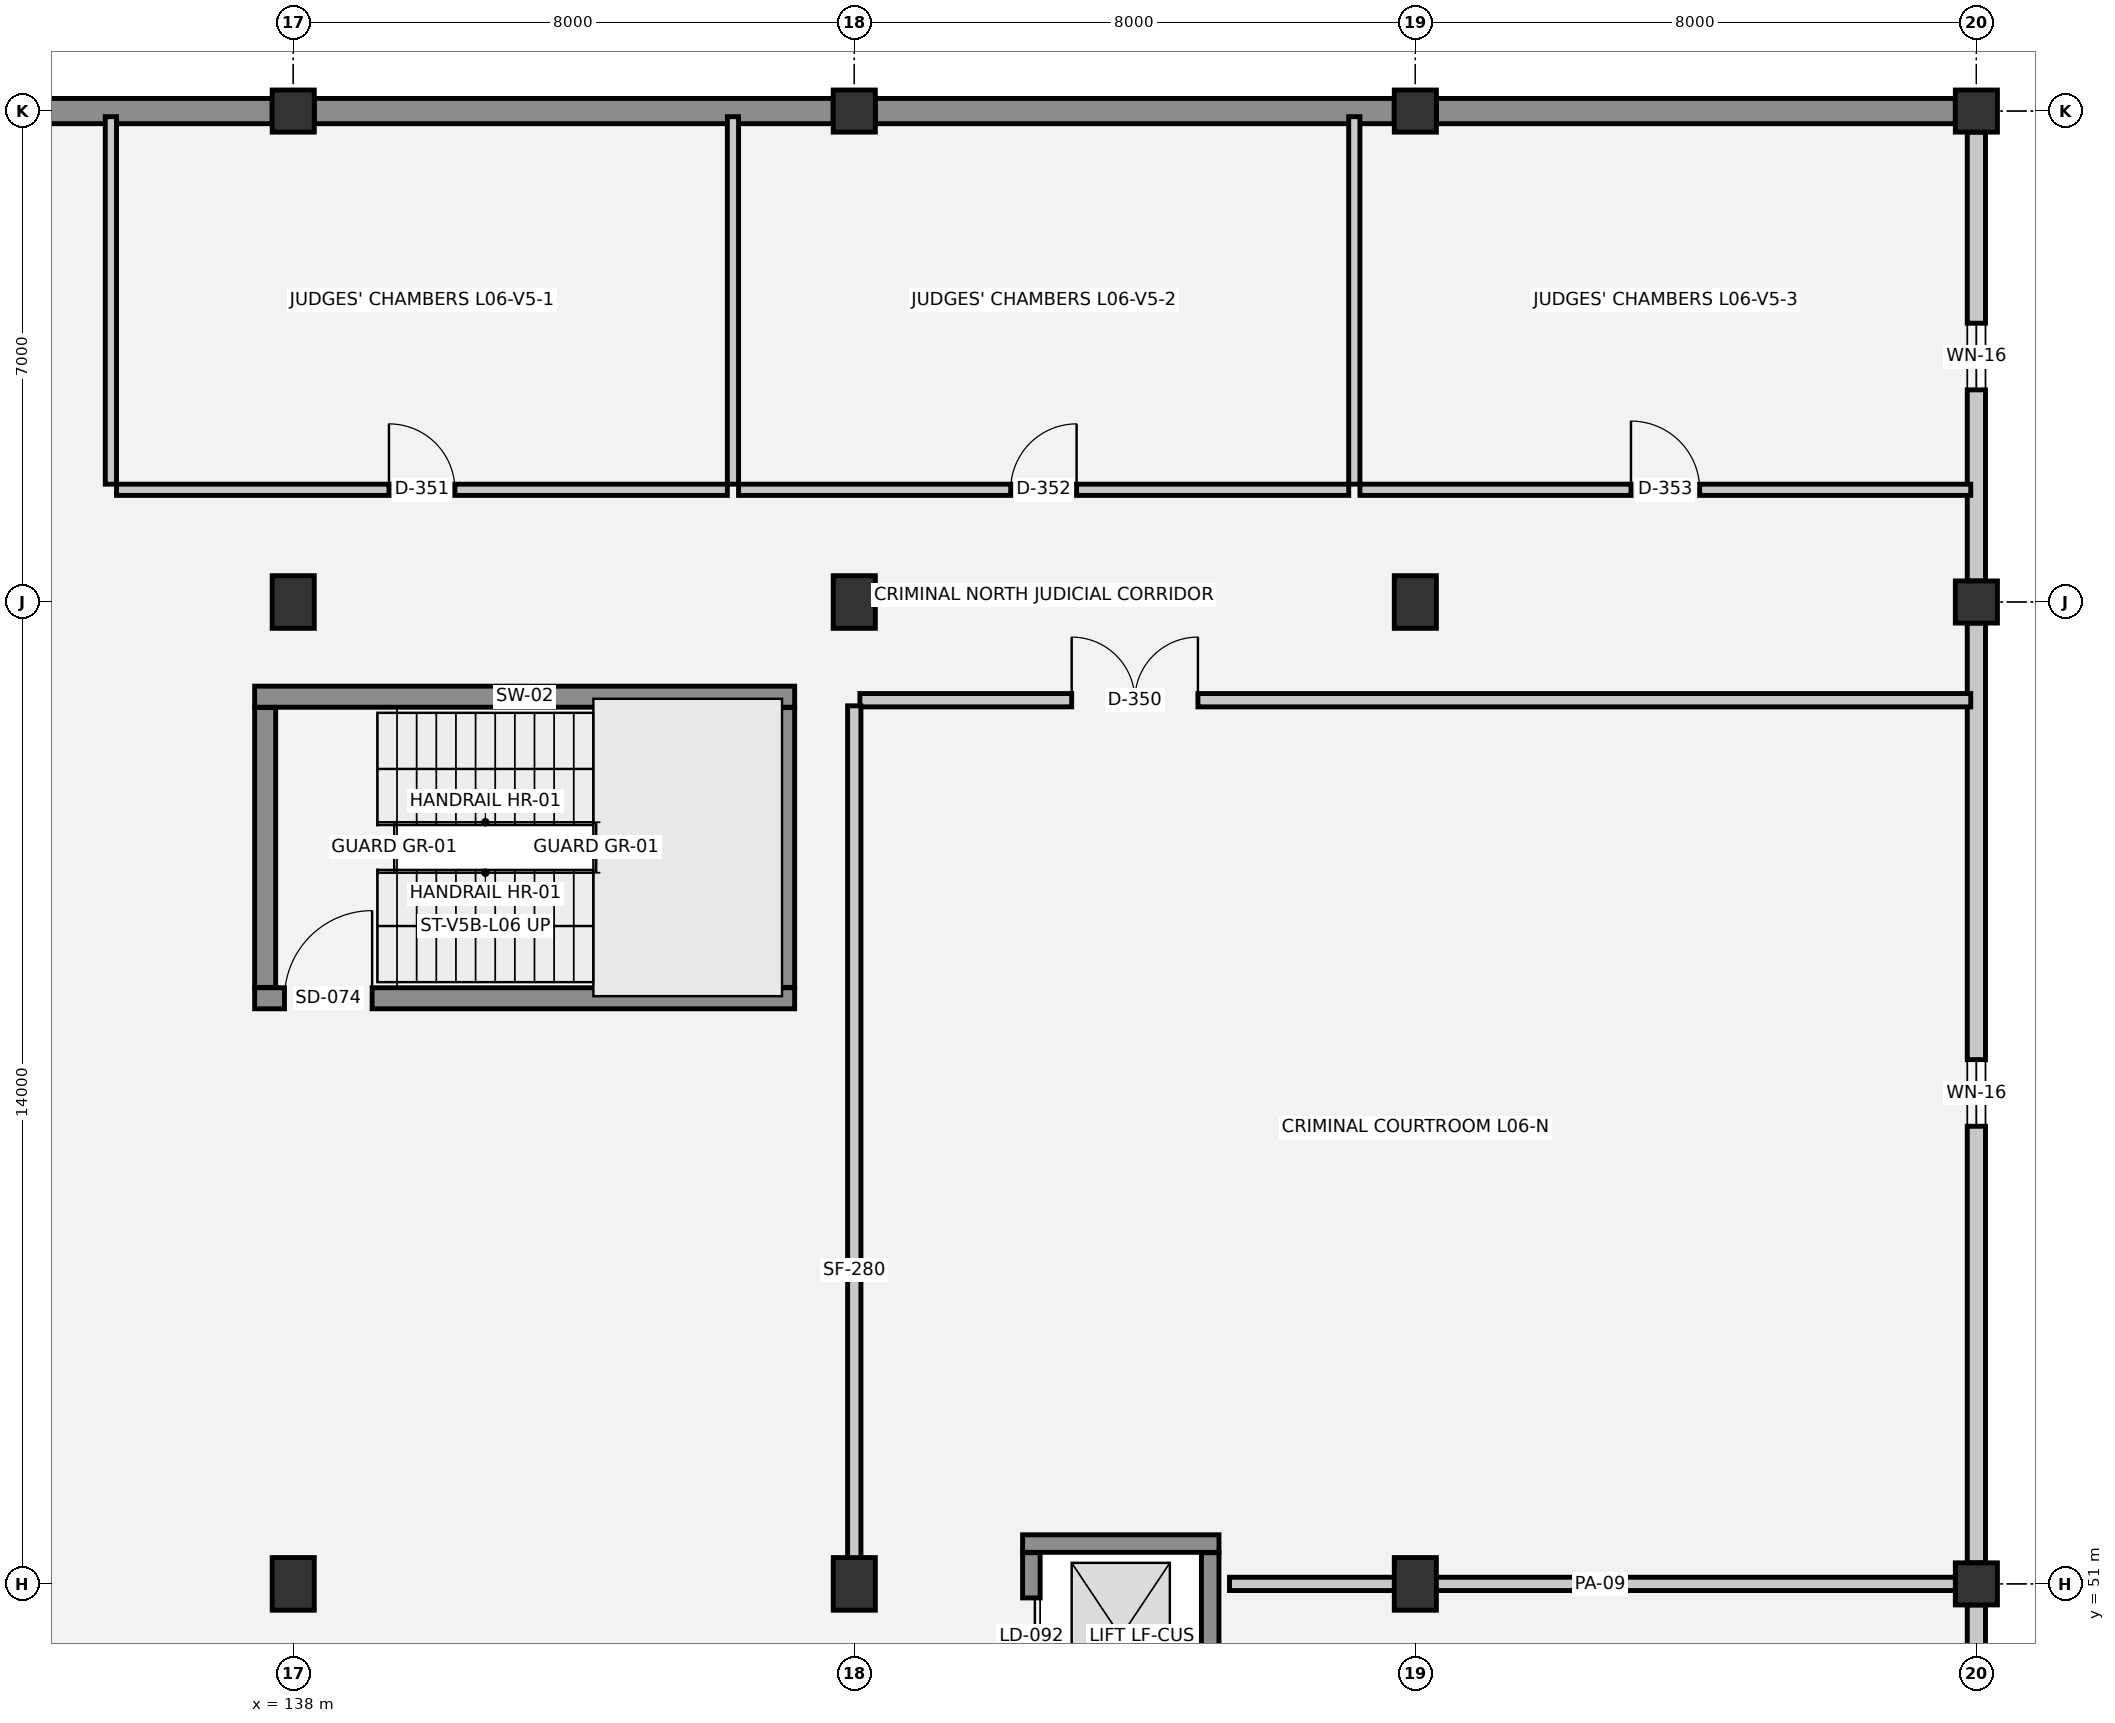
"""IFC4 building model, lengths in metres.
Left out: names, types, materials, properties, quantities, classifications, styles, units other than length and angle.
Written with IfcOpenShell. Run it as: python <this file> out.ifc"""

import sys

from ifc_helpers import new_model, si_unit, direction, frame, frame_2d, origin, origin_2d, place, context, subcontext, project, spatial, rectangle, extrude, element, fill, save


model = new_model("IFC4")
c1 = context("Model", 3, precision=1e-05, world=origin(), true_north=direction((0.0, 1.0)))
c2 = subcontext(c1, "Body", "Model", "MODEL_VIEW")
j1 = project(units=[si_unit("LENGTHUNIT", "METRE"), si_unit("PLANEANGLEUNIT", "RADIAN")], contexts=[c1])
p1 = place(None, origin())
s1 = spatial("IfcSite", under=j1, at=p1, CompositionType="ELEMENT")
p2 = place(p1, origin())
s2 = spatial("IfcBuilding", under=s1, at=p2, CompositionType="ELEMENT")
p3 = place(p2, frame((0.0, 0.0, 22.05)))
s3 = spatial("IfcBuildingStorey", under=s2, at=p3, CompositionType="ELEMENT", Elevation=22.05)
for number, where, z_axis, x_axis in (
    (1, (138.0, 51.0, 0.0), (0.0, 0.0, 1.0), (1.0, 0.0, 0.0)),
    (2, (138.0, 65.0, 0.0), (0.0, 0.0, 1.0), (1.0, 0.0, 0.0)),
):
    element("IfcColumn", number, at=place(p3, frame(where, z_axis=z_axis, x_axis=x_axis)), inside=s3, PredefinedType="COLUMN", context=c2, shape_type="SweptSolid", body=[
        extrude(rectangle(XDim=0.6, YDim=0.75, at=origin_2d()), origin(), (0.0, 0.0, 1.0), 3.75),
    ])
p4 = place(p3, frame((138.0, 72.0, 0.0), z_axis=(0.0, 0.0, 1.0), x_axis=(1.0, 0.0, 0.0)))
e3 = element("IfcColumn", 3, at=p4, inside=s3, PredefinedType="COLUMN", context=c2, shape_type="SweptSolid", body=[
    extrude(rectangle(XDim=0.6, YDim=0.6, at=origin_2d()), origin(), (0.0, 0.0, 1.0), 3.75),
])
for number, where, z_axis, x_axis in (
    (4, (146.0, 51.0, 0.0), (0.0, 0.0, 1.0), (1.0, 0.0, 0.0)),
    (5, (146.0, 65.0, 0.0), (0.0, 0.0, 1.0), (1.0, 0.0, 0.0)),
):
    element("IfcColumn", number, at=place(p3, frame(where, z_axis=z_axis, x_axis=x_axis)), inside=s3, PredefinedType="COLUMN", context=c2, shape_type="SweptSolid", body=[
        extrude(rectangle(XDim=0.6, YDim=0.75, at=origin_2d()), origin(), (0.0, 0.0, 1.0), 3.75),
    ])
p5 = place(p3, frame((146.0, 72.0, 0.0), z_axis=(0.0, 0.0, 1.0), x_axis=(1.0, 0.0, 0.0)))
e6 = element("IfcColumn", 6, at=p5, inside=s3, PredefinedType="COLUMN", context=c2, shape_type="SweptSolid", body=[
    extrude(rectangle(XDim=0.6, YDim=0.6, at=origin_2d()), origin(), (0.0, 0.0, 1.0), 3.75),
])
for number, where, z_axis, x_axis in (
    (7, (154.0, 51.0, 0.0), (0.0, 0.0, 1.0), (1.0, 0.0, 0.0)),
    (8, (154.0, 65.0, 0.0), (0.0, 0.0, 1.0), (1.0, 0.0, 0.0)),
):
    element("IfcColumn", number, at=place(p3, frame(where, z_axis=z_axis, x_axis=x_axis)), inside=s3, PredefinedType="COLUMN", context=c2, shape_type="SweptSolid", body=[
        extrude(rectangle(XDim=0.6, YDim=0.75, at=origin_2d()), origin(), (0.0, 0.0, 1.0), 3.75),
    ])
for number, where, z_axis, x_axis in (
    (9, (154.0, 72.0, 0.0), (0.0, 0.0, 1.0), (1.0, 0.0, 0.0)),
    (10, (162.0, 51.0, 0.0), (0.0, 0.0, 1.0), (1.0, 0.0, 0.0)),
    (11, (162.0, 65.0, 0.0), (0.0, 0.0, 1.0), (1.0, 0.0, 0.0)),
    (12, (162.0, 72.0, 0.0), (0.0, 0.0, 1.0), (1.0, 0.0, 0.0)),
):
    element("IfcColumn", number, at=place(p3, frame(where, z_axis=z_axis, x_axis=x_axis)), inside=s3, PredefinedType="COLUMN", context=c2, shape_type="SweptSolid", body=[
        extrude(rectangle(XDim=0.6, YDim=0.6, at=origin_2d()), origin(), (0.0, 0.0, 1.0), 3.75),
    ])
for number, where, z_axis, x_axis in (
    (13, (130.3, 72.0, 0.0), (0.0, 0.0, 1.0), (1.0, 0.0, 0.0)),
    (14, (138.3, 72.0, 0.0), (0.0, 0.0, 1.0), (1.0, 0.0, 0.0)),
    (15, (146.3, 72.0, 0.0), (0.0, 0.0, 1.0), (1.0, 0.0, 0.0)),
    (16, (154.3, 72.0, 0.0), (0.0, 0.0, 1.0), (1.0, 0.0, 0.0)),
):
    element("IfcWall", number, at=place(p3, frame(where, z_axis=z_axis, x_axis=x_axis)), inside=s3, PredefinedType="SOLIDWALL", context=c2, shape_type="SweptSolid", body=[
        extrude(rectangle(XDim=7.4, YDim=0.36, at=frame_2d((3.7, 0.0))), origin(), (0.0, 0.0, 1.0), 3.47),
    ])
p6 = place(p3, frame((162.0, 71.7, 0.0), z_axis=(0.0, 0.0, 1.0), x_axis=(0.0, -1.0, 0.0)))
e17 = element("IfcWall", 17, at=p6, inside=s3, PredefinedType="SOLIDWALL", context=c2, shape_type="SweptSolid", body=[
    extrude(rectangle(XDim=6.4, YDim=0.26, at=frame_2d((3.2, 0.0))), origin(), (0.0, 0.0, 1.0), 2.51),
])
p7 = place(p6, frame((2.725, 0.0, 1.0)))
e18 = element("IfcOpeningElement", 18, at=p7, cuts=e17, PredefinedType="OPENING", context=c2, shape_type="SweptSolid", body=[
    extrude(rectangle(XDim=0.95, YDim=1.1, at=frame_2d((0.475, 0.55))), frame((0.0, 0.14, 0.0), z_axis=(0.0, -1.0, 0.0), x_axis=(1.0, 0.0, 0.0)), (0.0, 0.0, 1.0), 0.28),
])
p8 = place(p3, frame((162.0, 64.7, 0.0), z_axis=(0.0, 0.0, 1.0), x_axis=(0.0, -1.0, 0.0)))
e19 = element("IfcWall", 19, at=p8, inside=s3, PredefinedType="SOLIDWALL", context=c2, shape_type="SweptSolid", body=[
    extrude(rectangle(XDim=13.4, YDim=0.26, at=frame_2d((6.7, 0.0))), origin(), (0.0, 0.0, 1.0), 2.51),
])
p9 = place(p8, frame((6.225, 0.0, 1.0)))
e20 = element("IfcOpeningElement", 20, at=p9, cuts=e19, PredefinedType="OPENING", context=c2, shape_type="SweptSolid", body=[
    extrude(rectangle(XDim=0.95, YDim=1.1, at=frame_2d((0.475, 0.55))), frame((0.0, 0.14, 0.0), z_axis=(0.0, -1.0, 0.0), x_axis=(1.0, 0.0, 0.0)), (0.0, 0.0, 1.0), 0.28),
])
p10 = place(p3, frame((162.0, 50.7, 0.0), z_axis=(0.0, 0.0, 1.0), x_axis=(0.0, -1.0, 0.0)))
e21 = element("IfcWall", 21, at=p10, inside=s3, PredefinedType="SOLIDWALL", context=c2, shape_type="SweptSolid", body=[
    extrude(rectangle(XDim=6.4, YDim=0.26, at=frame_2d((3.2, 0.0))), origin(), (0.0, 0.0, 1.0), 2.51),
])
p11 = place(p10, frame((2.725, 0.0, 1.0)))
e22 = element("IfcOpeningElement", 22, at=p11, cuts=e21, PredefinedType="OPENING", context=c2, shape_type="SweptSolid", body=[
    extrude(rectangle(XDim=0.95, YDim=1.1, at=frame_2d((0.475, 0.55))), frame((0.0, 0.14, 0.0), z_axis=(0.0, -1.0, 0.0), x_axis=(1.0, 0.0, 0.0)), (0.0, 0.0, 1.0), 0.28),
])
p12 = place(p3, frame((151.2, 51.575, 0.0), z_axis=(0.0, 0.0, 1.0), x_axis=(-1.0, 0.0, 0.0)))
e23 = element("IfcWall", 23, at=p12, inside=s3, PredefinedType="SHEAR", context=c2, shape_type="SweptSolid", body=[
    extrude(rectangle(XDim=2.8, YDim=0.25, at=frame_2d((1.4, 0.0))), origin(), (0.0, 0.0, 1.0), 3.47),
])
p13 = place(p3, frame((148.525, 51.445, 0.0), z_axis=(0.0, 0.0, 1.0), x_axis=(0.0, -1.0, 0.0)))
e24 = element("IfcWall", 24, at=p13, inside=s3, PredefinedType="SHEAR", context=c2, shape_type="SweptSolid", body=[
    extrude(rectangle(XDim=2.39, YDim=0.25, at=frame_2d((1.195, 0.0))), origin(), (0.0, 0.0, 1.0), 3.47),
])
p14 = place(p13, frame((0.645, 0.0, 0.0)))
e25 = element("IfcOpeningElement", 25, at=p14, cuts=e24, PredefinedType="OPENING", context=c2, shape_type="SweptSolid", body=[
    extrude(rectangle(XDim=1.1, YDim=2.15, at=frame_2d((0.55, 1.075))), frame((0.0, 0.135, 0.0), z_axis=(0.0, -1.0, 0.0), x_axis=(1.0, 0.0, 0.0)), (0.0, 0.0, 1.0), 0.27),
])
p15 = place(p3, frame((151.075, 49.055, 0.0), z_axis=(0.0, 0.0, 1.0), x_axis=(0.0, 1.0, 0.0)))
e26 = element("IfcWall", 26, at=p15, inside=s3, PredefinedType="SHEAR", context=c2, shape_type="SweptSolid", body=[
    extrude(rectangle(XDim=2.39, YDim=0.25, at=frame_2d((1.195, 0.0))), origin(), (0.0, 0.0, 1.0), 3.47),
])
p16 = place(p3, frame((145.15, 63.65, 0.0), z_axis=(0.0, 0.0, 1.0), x_axis=(-1.0, 0.0, 0.0)))
e27 = element("IfcWall", 27, at=p16, inside=s3, PredefinedType="SHEAR", context=c2, shape_type="SweptSolid", body=[
    extrude(rectangle(XDim=7.7, YDim=0.3, at=frame_2d((3.85, 0.0))), origin(), (0.0, 0.0, 1.0), 3.47),
])
p17 = place(p3, frame((137.45, 59.35, 0.0), z_axis=(0.0, 0.0, 1.0), x_axis=(1.0, 0.0, 0.0)))
e28 = element("IfcWall", 28, at=p17, inside=s3, PredefinedType="SHEAR", context=c2, shape_type="SweptSolid", body=[
    extrude(rectangle(XDim=7.7, YDim=0.3, at=frame_2d((3.85, 0.0))), origin(), (0.0, 0.0, 1.0), 3.47),
])
p18 = place(p17, frame((0.425, 0.0, 0.0)))
e29 = element("IfcOpeningElement", 29, at=p18, cuts=e28, PredefinedType="OPENING", context=c2, shape_type="SweptSolid", body=[
    extrude(rectangle(XDim=1.25, YDim=2.15, at=frame_2d((0.625, 1.075))), frame((0.0, 0.16, 0.0), z_axis=(0.0, -1.0, 0.0), x_axis=(1.0, 0.0, 0.0)), (0.0, 0.0, 1.0), 0.32),
])
for number, where, z_axis, x_axis in (
    (30, (137.6, 63.495, 0.0), (0.0, 0.0, 1.0), (0.0, -1.0, 0.0)),
    (31, (145.0, 59.505, 0.0), (0.0, 0.0, 1.0), (0.0, 1.0, 0.0)),
):
    element("IfcWall", number, at=place(p3, frame(where, z_axis=z_axis, x_axis=x_axis)), inside=s3, PredefinedType="SHEAR", context=c2, shape_type="SweptSolid", body=[
        extrude(rectangle(XDim=3.99, YDim=0.3, at=frame_2d((1.995, 0.0))), origin(), (0.0, 0.0, 1.0), 3.47),
    ])
p19 = place(p3, frame((151.35, 51.0, 0.0), z_axis=(0.0, 0.0, 1.0), x_axis=(1.0, 0.0, 0.0)))
e32 = element("IfcWall", 32, at=p19, inside=s3, PredefinedType="PARTITIONING", context=c2, shape_type="SweptSolid", body=[
    extrude(rectangle(XDim=10.57, YDim=0.19, at=frame_2d((5.285, 0.0))), origin(), (0.0, 0.0, 1.0), 2.78),
])
p20 = place(p3, frame((146.08, 63.6, 0.0), z_axis=(0.0, 0.0, 1.0), x_axis=(1.0, 0.0, 0.0)))
e33 = element("IfcWall", 33, at=p20, inside=s3, PredefinedType="PARTITIONING", context=c2, shape_type="SweptSolid", body=[
    extrude(rectangle(XDim=15.84, YDim=0.19, at=frame_2d((7.92, 0.0))), origin(), (0.0, 0.0, 1.0), 3.39),
])
p21 = place(p20, frame((3.02, 0.0, 0.0)))
e34 = element("IfcOpeningElement", 34, at=p21, cuts=e33, PredefinedType="OPENING", context=c2, shape_type="SweptSolid", body=[
    extrude(rectangle(XDim=1.8, YDim=2.3, at=frame_2d((0.9, 1.15))), frame((0.0, 0.105, 0.0), z_axis=(0.0, -1.0, 0.0), x_axis=(1.0, 0.0, 0.0)), (0.0, 0.0, 1.0), 0.21),
])
p22 = place(p3, frame((135.48, 66.6, 0.0), z_axis=(0.0, 0.0, 1.0), x_axis=(1.0, 0.0, 0.0)))
e35 = element("IfcWall", 35, at=p22, inside=s3, PredefinedType="PARTITIONING", context=c2, shape_type="SweptSolid", body=[
    extrude(rectangle(XDim=8.71, YDim=0.16, at=frame_2d((4.355, 0.0))), origin(), (0.0, 0.0, 1.0), 3.39),
])
p23 = place(p22, frame((3.885, 0.0, 0.0)))
e36 = element("IfcOpeningElement", 36, at=p23, cuts=e35, PredefinedType="OPENING", context=c2, shape_type="SweptSolid", body=[
    extrude(rectangle(XDim=0.94, YDim=2.1, at=frame_2d((0.47, 1.05))), frame((0.0, 0.09, 0.0), z_axis=(0.0, -1.0, 0.0), x_axis=(1.0, 0.0, 0.0)), (0.0, 0.0, 1.0), 0.18),
])
p24 = place(p3, frame((144.35, 66.6, 0.0), z_axis=(0.0, 0.0, 1.0), x_axis=(1.0, 0.0, 0.0)))
e37 = element("IfcWall", 37, at=p24, inside=s3, PredefinedType="PARTITIONING", context=c2, shape_type="SweptSolid", body=[
    extrude(rectangle(XDim=8.7, YDim=0.16, at=frame_2d((4.35, 0.0))), origin(), (0.0, 0.0, 1.0), 3.39),
])
p25 = place(p24, frame((3.88, 0.0, 0.0)))
e38 = element("IfcOpeningElement", 38, at=p25, cuts=e37, PredefinedType="OPENING", context=c2, shape_type="SweptSolid", body=[
    extrude(rectangle(XDim=0.94, YDim=2.15, at=frame_2d((0.47, 1.075))), frame((0.0, 0.09, 0.0), z_axis=(0.0, -1.0, 0.0), x_axis=(1.0, 0.0, 0.0)), (0.0, 0.0, 1.0), 0.18),
])
p26 = place(p3, frame((153.21, 66.6, 0.0), z_axis=(0.0, 0.0, 1.0), x_axis=(1.0, 0.0, 0.0)))
e39 = element("IfcWall", 39, at=p26, inside=s3, PredefinedType="PARTITIONING", context=c2, shape_type="SweptSolid", body=[
    extrude(rectangle(XDim=8.71, YDim=0.16, at=frame_2d((4.355, 0.0))), origin(), (0.0, 0.0, 1.0), 3.39),
])
p27 = place(p26, frame((3.865, 0.0, 0.0)))
e40 = element("IfcOpeningElement", 40, at=p27, cuts=e39, PredefinedType="OPENING", context=c2, shape_type="SweptSolid", body=[
    extrude(rectangle(XDim=0.98, YDim=2.1, at=frame_2d((0.49, 1.05))), frame((0.0, 0.09, 0.0), z_axis=(0.0, -1.0, 0.0), x_axis=(1.0, 0.0, 0.0)), (0.0, 0.0, 1.0), 0.18),
])
for number, where, z_axis, x_axis in (
    (41, (135.4, 66.68, 0.0), (0.0, 0.0, 1.0), (0.0, 1.0, 0.0)),
    (42, (144.27, 66.68, 0.0), (0.0, 0.0, 1.0), (0.0, 1.0, 0.0)),
):
    element("IfcWall", number, at=place(p3, frame(where, z_axis=z_axis, x_axis=x_axis)), inside=s3, PredefinedType="PARTITIONING", context=c2, shape_type="SweptSolid", body=[
        extrude(rectangle(XDim=5.24, YDim=0.16, at=frame_2d((2.62, 0.0))), origin(), (0.0, 0.0, 1.0), 3.39),
    ])
p28 = place(p3, frame((146.0, 51.35, 0.0), z_axis=(0.0, 0.0, 1.0), x_axis=(0.0, 1.0, 0.0)))
e43 = element("IfcWall", 43, at=p28, inside=s3, PredefinedType="PARTITIONING", context=c2, shape_type="SweptSolid", body=[
    extrude(rectangle(XDim=12.17, YDim=0.19, at=frame_2d((6.085, 0.0))), origin(), (0.0, 0.0, 1.0), 2.58),
])
p29 = place(p3, frame((153.13, 66.68, 0.0), z_axis=(0.0, 0.0, 1.0), x_axis=(0.0, 1.0, 0.0)))
e44 = element("IfcWall", 44, at=p29, inside=s3, PredefinedType="PARTITIONING", context=c2, shape_type="SweptSolid", body=[
    extrude(rectangle(XDim=5.24, YDim=0.16, at=frame_2d((2.62, 0.0))), origin(), (0.0, 0.0, 1.0), 3.39),
])
p30 = place(p7, origin())
e45 = element("IfcWindow", 45, at=p30, inside=s3, PartitioningType="SINGLE_PANEL", PredefinedType="WINDOW", context=c2, shape_type="SweptSolid", body=[
    extrude(rectangle(XDim=0.95, YDim=1.1, at=frame_2d((0.475, 0.55))), frame((0.0, 0.03, 0.0), z_axis=(0.0, -1.0, 0.0), x_axis=(1.0, 0.0, 0.0)), (0.0, 0.0, 1.0), 0.06),
])
fill(e18, e45)
p31 = place(p9, origin())
e46 = element("IfcWindow", 46, at=p31, inside=s3, PartitioningType="SINGLE_PANEL", PredefinedType="WINDOW", context=c2, shape_type="SweptSolid", body=[
    extrude(rectangle(XDim=0.95, YDim=1.1, at=frame_2d((0.475, 0.55))), frame((0.0, 0.03, 0.0), z_axis=(0.0, -1.0, 0.0), x_axis=(1.0, 0.0, 0.0)), (0.0, 0.0, 1.0), 0.06),
])
fill(e20, e46)
p32 = place(p14, origin())
e47 = element("IfcDoor", 47, at=p32, inside=s3, OperationType="DOUBLE_DOOR_SLIDING", PredefinedType="DOOR", context=c2, shape_type="SweptSolid", body=[
    extrude(rectangle(XDim=1.1, YDim=2.15, at=frame_2d((0.55, 1.075))), frame((0.0, 0.025, 0.0), z_axis=(0.0, -1.0, 0.0), x_axis=(1.0, 0.0, 0.0)), (0.0, 0.0, 1.0), 0.05),
])
fill(e25, e47)
p33 = place(p18, origin())
e48 = element("IfcDoor", 48, at=p33, inside=s3, OperationType="SINGLE_SWING_RIGHT", PredefinedType="DOOR", context=c2, shape_type="SweptSolid", body=[
    extrude(rectangle(XDim=1.25, YDim=2.15, at=frame_2d((0.625, 1.075))), frame((0.0, 0.025, 0.0), z_axis=(0.0, -1.0, 0.0), x_axis=(1.0, 0.0, 0.0)), (0.0, 0.0, 1.0), 0.05),
])
fill(e29, e48)
p34 = place(p21, origin())
e49 = element("IfcDoor", 49, at=p34, inside=s3, OperationType="DOUBLE_DOOR_SINGLE_SWING", PredefinedType="DOOR", context=c2, shape_type="SweptSolid", body=[
    extrude(rectangle(XDim=1.8, YDim=2.3, at=frame_2d((0.9, 1.15))), frame((0.0, 0.025, 0.0), z_axis=(0.0, -1.0, 0.0), x_axis=(1.0, 0.0, 0.0)), (0.0, 0.0, 1.0), 0.05),
])
fill(e34, e49)
p35 = place(p23, origin())
e50 = element("IfcDoor", 50, at=p35, inside=s3, OperationType="SINGLE_SWING_LEFT", PredefinedType="DOOR", context=c2, shape_type="SweptSolid", body=[
    extrude(rectangle(XDim=0.94, YDim=2.1, at=frame_2d((0.47, 1.05))), frame((0.0, 0.025, 0.0), z_axis=(0.0, -1.0, 0.0), x_axis=(1.0, 0.0, 0.0)), (0.0, 0.0, 1.0), 0.05),
])
fill(e36, e50)
p36 = place(p25, origin())
e51 = element("IfcDoor", 51, at=p36, inside=s3, OperationType="SINGLE_SWING_RIGHT", PredefinedType="DOOR", context=c2, shape_type="SweptSolid", body=[
    extrude(rectangle(XDim=0.94, YDim=2.15, at=frame_2d((0.47, 1.075))), frame((0.0, 0.025, 0.0), z_axis=(0.0, -1.0, 0.0), x_axis=(1.0, 0.0, 0.0)), (0.0, 0.0, 1.0), 0.05),
])
fill(e38, e51)
p37 = place(p27, origin())
e52 = element("IfcDoor", 52, at=p37, inside=s3, OperationType="SINGLE_SWING_LEFT", PredefinedType="DOOR", context=c2, shape_type="SweptSolid", body=[
    extrude(rectangle(XDim=0.98, YDim=2.1, at=frame_2d((0.49, 1.05))), frame((0.0, 0.025, 0.0), z_axis=(0.0, -1.0, 0.0), x_axis=(1.0, 0.0, 0.0)), (0.0, 0.0, 1.0), 0.05),
])
fill(e40, e52)
save(model, sys.argv[1])
